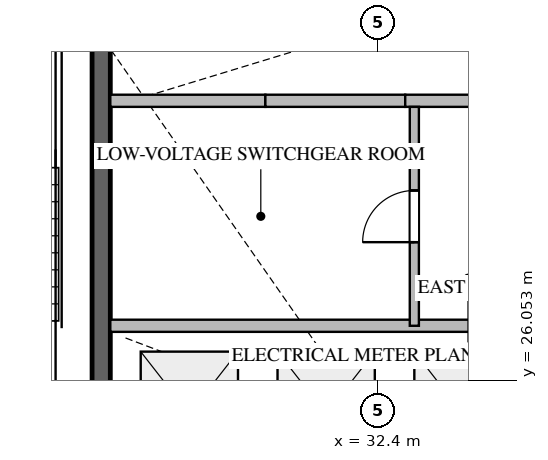
"""IFC4 building model, lengths in metres.
Left out: names, types, materials, properties, quantities, classifications, styles, units other than length and angle.
Written with IfcOpenShell. Run it as: python <this file> out.ifc"""

import sys

from ifc_helpers import new_model, si_unit, direction, frame, frame_2d, origin, place, context, subcontext, project, spatial, rectangle, extrude, source, transform, mapped, element, fill, save


model = new_model("IFC4")
c1 = context("Model", 3, precision=1e-05, world=origin(), true_north=direction((0.0, 1.0)))
c2 = subcontext(c1, "Body", "Model", "MODEL_VIEW")
j1 = project(units=[si_unit("LENGTHUNIT", "METRE"), si_unit("PLANEANGLEUNIT", "RADIAN")], contexts=[c1])
p1 = place(None, origin())
s1 = spatial("IfcSite", under=j1, at=p1, CompositionType="ELEMENT")
p2 = place(p1, origin())
s2 = spatial("IfcBuilding", under=s1, at=p2, CompositionType="ELEMENT")
p3 = place(p2, frame((0.0, 0.0, 123.9)))
s3 = spatial("IfcBuildingStorey", under=s2, at=p3, CompositionType="ELEMENT", Elevation=123.9)
p4 = place(p3, frame((27.85, 23.55, -0.26), z_axis=(0.0, 0.0, 1.0), x_axis=(0.0, 1.0, 0.0)))
e1 = element("IfcWall", 1, at=p4, inside=s3, PredefinedType="SHEAR", context=c2, shape_type="SweptSolid", body=[
    extrude(rectangle(XDim=9.85, YDim=0.3, at=frame_2d((4.925, 0.0))), origin(), (0.0, 0.0, 1.0), 3.748),
])
p5 = place(p3, frame((28.0, 30.65, 0.0), z_axis=(0.0, 0.0, 1.0), x_axis=(1.0, 0.0, 0.0)))
e2 = element("IfcWall", 2, at=p5, inside=s3, PredefinedType="STANDARD", context=c2, shape_type="SweptSolid", body=[
    extrude(rectangle(XDim=2.55, YDim=0.2, at=frame_2d((1.275, 0.0))), origin(), (0.0, 0.0, 1.0), 3.49),
])
p6 = place(p3, frame((30.55, 30.65, 0.0), z_axis=(0.0, 0.0, 1.0), x_axis=(1.0, 0.0, 0.0)))
e3 = element("IfcWall", 3, at=p6, inside=s3, PredefinedType="STANDARD", context=c2, shape_type="SweptSolid", body=[
    extrude(rectangle(XDim=2.3, YDim=0.2, at=frame_2d((1.15, 0.0))), origin(), (0.0, 0.0, 1.0), 3.49),
])
p7 = place(p3, frame((32.85, 30.65, 0.0), z_axis=(0.0, 0.0, 1.0), x_axis=(1.0, 0.0, 0.0)))
e4 = element("IfcWall", 4, at=p7, inside=s3, PredefinedType="STANDARD", context=c2, shape_type="SweptSolid", body=[
    extrude(rectangle(XDim=2.15, YDim=0.2, at=frame_2d((1.075, 0.0))), origin(), (0.0, 0.0, 1.0), 3.49),
])
p8 = place(p3, frame((28.0, 26.95, 0.0), z_axis=(0.0, 0.0, 1.0), x_axis=(1.0, 0.0, 0.0)))
e5 = element("IfcWall", 5, at=p8, inside=s3, PredefinedType="STANDARD", context=c2, shape_type="SweptSolid", body=[
    extrude(rectangle(XDim=6.95, YDim=0.2, at=frame_2d((3.475, 0.0))), origin(), (0.0, 0.0, 1.0), 3.49),
])
p9 = place(p3, frame((33.0, 26.95, 0.0), z_axis=(0.0, 0.0, 1.0), x_axis=(0.0, 1.0, 0.0)))
e6 = element("IfcWall", 6, at=p9, inside=s3, PredefinedType="PARTITIONING", context=c2, shape_type="SweptSolid", body=[
    extrude(rectangle(XDim=3.6, YDim=0.15, at=frame_2d((1.8, 0.0))), origin(), (0.0, 0.0, 1.0), 3.49),
])
p10 = place(p9, frame((1.375, 0.0, 0.0)))
e7 = element("IfcOpeningElement", 7, at=p10, cuts=e6, PredefinedType="OPENING", context=c2, shape_type="SweptSolid", body=[
    extrude(rectangle(XDim=0.85, YDim=2.1, at=frame_2d((0.425, 1.05))), frame((0.0, 0.085, 0.0), z_axis=(0.0, -1.0, 0.0), x_axis=(1.0, 0.0, 0.0)), (0.0, 0.0, 1.0), 0.17),
])
m1 = source(origin(), c2, "Body", "SweptSolid", [
    extrude(rectangle(XDim=0.85, YDim=2.1, at=frame_2d((0.425, 1.05))), frame((0.0, 0.025, 0.0), z_axis=(0.0, -1.0, 0.0), x_axis=(1.0, 0.0, 0.0)), (0.0, 0.0, 1.0), 0.05),
])
p11 = place(p10, origin())
e8 = element("IfcDoor", 8, at=p11, inside=s3, OperationType="SINGLE_SWING_LEFT", PredefinedType="DOOR", context=c2, shape_type="MappedRepresentation", body=[
    mapped(m1, transform((0.0, 0.0, 0.0), scale=1.0)),
])
fill(e7, e8)
save(model, sys.argv[1])
